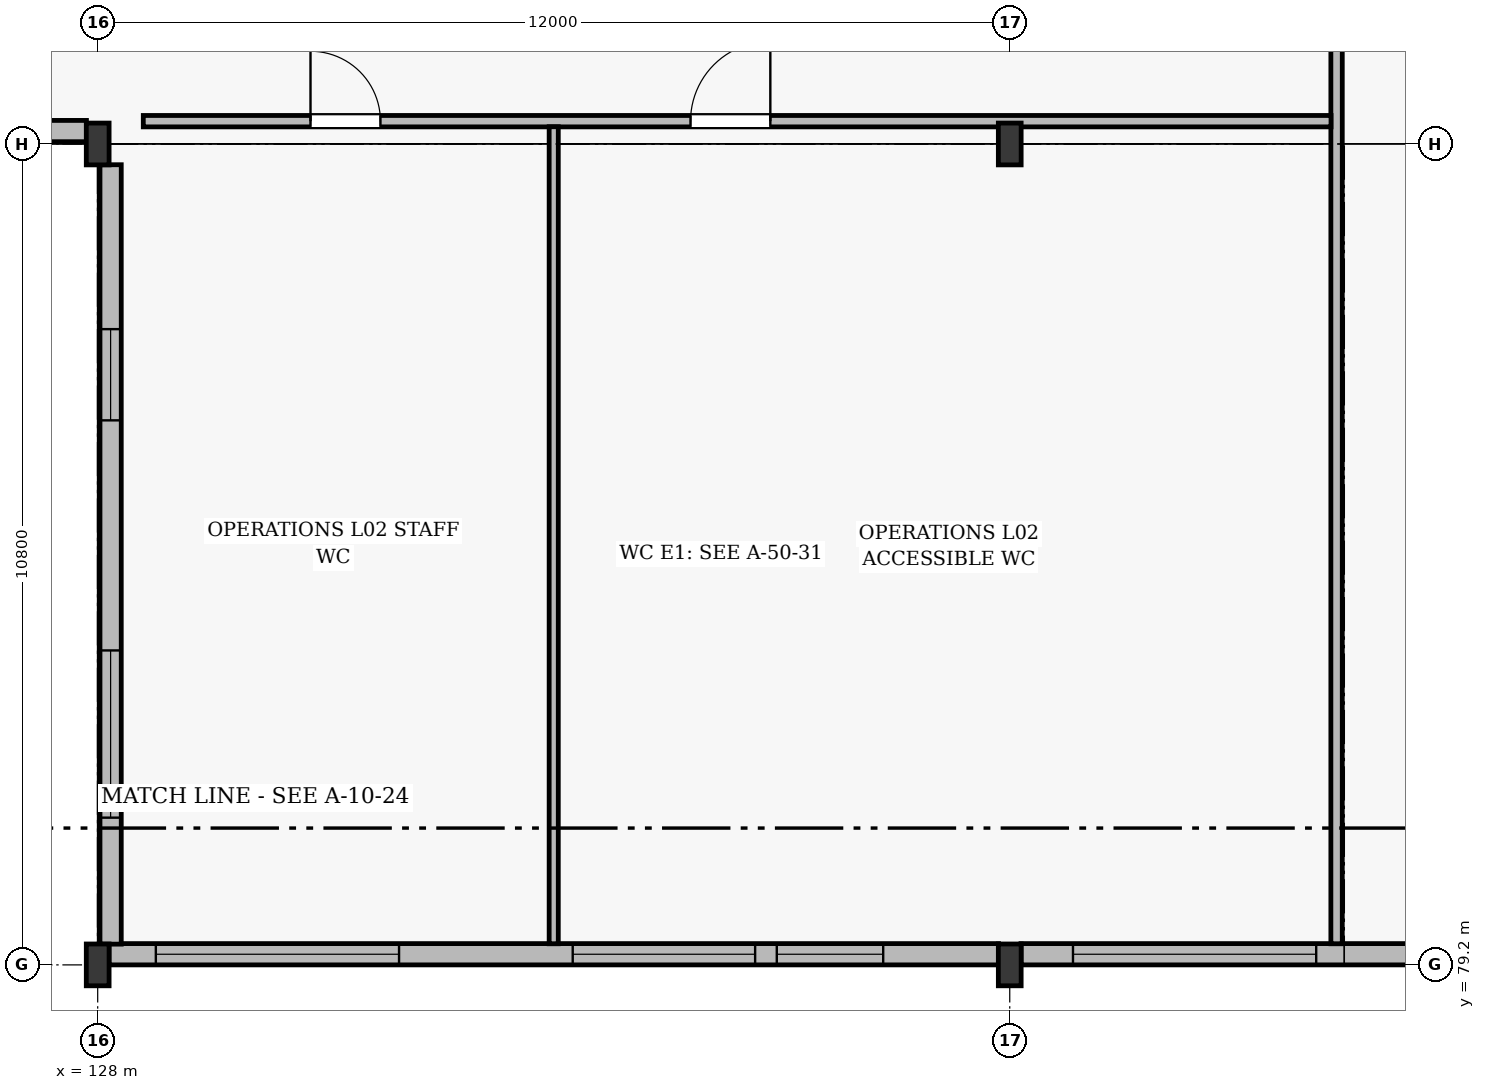
"""IFC4 building model, lengths in metres.
Left out: names, types, materials, properties, quantities, classifications, styles, units other than length and angle.
Written with IfcOpenShell. Run it as: python <this file> out.ifc"""

import sys

from ifc_helpers import new_model, si_unit, direction, frame, frame_2d, origin, origin_2d, place, context, subcontext, project, spatial, rectangle, i_section, extrude, element, fill, save


model = new_model("IFC4")
c1 = context("Model", 3, precision=1e-05, world=origin(), true_north=direction((0.0, 1.0)))
c2 = subcontext(c1, "Body", "Model", "MODEL_VIEW")
j1 = project(units=[si_unit("LENGTHUNIT", "METRE"), si_unit("PLANEANGLEUNIT", "RADIAN")], contexts=[c1])
p1 = place(None, origin())
s1 = spatial("IfcSite", under=j1, at=p1, CompositionType="ELEMENT")
p2 = place(p1, origin())
s2 = spatial("IfcBuilding", under=s1, at=p2, CompositionType="ELEMENT")
p3 = place(p2, frame((0.0, 0.0, 12.6)))
s3 = spatial("IfcBuildingStorey", under=s2, at=p3, CompositionType="ELEMENT", Elevation=12.6)
for number, where, z_axis, x_axis in (
    (1, (128.0, 79.2, 0.0), (0.0, 0.0, 1.0), (1.0, 0.0, 0.0)),
    (2, (128.0, 90.0, 0.0), (0.0, 0.0, 1.0), (1.0, 0.0, 0.0)),
    (3, (140.0, 79.2, 0.0), (0.0, 0.0, 1.0), (1.0, 0.0, 0.0)),
    (4, (140.0, 90.0, 0.0), (0.0, 0.0, 1.0), (1.0, 0.0, 0.0)),
):
    element("IfcColumn", number, at=place(p3, frame(where, z_axis=z_axis, x_axis=x_axis)), inside=s3, PredefinedType="COLUMN", context=c2, shape_type="SweptSolid", body=[
        extrude(i_section(OverallWidth=0.3, OverallDepth=0.55, WebThickness=0.015, FlangeThickness=0.029, at=origin_2d()), origin(), (0.0, 0.0, 1.0), 4.8),
    ])
p4 = place(p3, frame((128.148, 79.34, 0.0), z_axis=(0.0, 0.0, 1.0), x_axis=(1.0, 0.0, 0.0)))
e5 = element("IfcWall", 5, at=p4, inside=s3, PredefinedType="STANDARD", context=c2, shape_type="SweptSolid", body=[
    extrude(rectangle(XDim=11.704, YDim=0.28, at=frame_2d((5.852, 0.0))), origin(), (0.0, 0.0, 1.0), 3.9),
])
p5 = place(p4, frame((0.617, 0.0, 0.75)))
e6 = element("IfcOpeningElement", 6, at=p5, cuts=e5, PredefinedType="OPENING", context=c2, shape_type="SweptSolid", body=[
    extrude(rectangle(XDim=3.2, YDim=2.8, at=frame_2d((1.6, 1.4))), frame((0.0, 0.152, 0.0), z_axis=(0.0, -1.0, 0.0), x_axis=(1.0, 0.0, 0.0)), (0.0, 0.0, 1.0), 0.304),
])
p6 = place(p4, frame((6.102, 0.0, 0.75)))
e7 = element("IfcOpeningElement", 7, at=p6, cuts=e5, PredefinedType="OPENING", context=c2, shape_type="SweptSolid", body=[
    extrude(rectangle(XDim=2.4, YDim=2.4, at=frame_2d((1.2, 1.2))), frame((0.0, 0.152, 0.0), z_axis=(0.0, -1.0, 0.0), x_axis=(1.0, 0.0, 0.0)), (0.0, 0.0, 1.0), 0.304),
])
p7 = place(p4, frame((8.787, 0.0, 1.05)))
e8 = element("IfcOpeningElement", 8, at=p7, cuts=e5, PredefinedType="OPENING", context=c2, shape_type="SweptSolid", body=[
    extrude(rectangle(XDim=1.4, YDim=1.8, at=frame_2d((0.7, 0.9))), frame((0.0, 0.152, 0.0), z_axis=(0.0, -1.0, 0.0), x_axis=(1.0, 0.0, 0.0)), (0.0, 0.0, 1.0), 0.304),
])
p8 = place(p3, frame((140.148, 79.34, 0.0), z_axis=(0.0, 0.0, 1.0), x_axis=(1.0, 0.0, 0.0)))
e9 = element("IfcWall", 9, at=p8, inside=s3, PredefinedType="STANDARD", context=c2, shape_type="SweptSolid", body=[
    extrude(rectangle(XDim=12.704, YDim=0.28, at=frame_2d((6.352, 0.0))), origin(), (0.0, 0.0, 1.0), 3.9),
])
p9 = place(p8, frame((0.684, 0.0, 0.75)))
e10 = element("IfcOpeningElement", 10, at=p9, cuts=e9, PredefinedType="OPENING", context=c2, shape_type="SweptSolid", body=[
    extrude(rectangle(XDim=3.2, YDim=2.8, at=frame_2d((1.6, 1.4))), frame((0.0, 0.152, 0.0), z_axis=(0.0, -1.0, 0.0), x_axis=(1.0, 0.0, 0.0)), (0.0, 0.0, 1.0), 0.304),
])
p10 = place(p8, frame((5.152, 0.0, 0.75)))
e11 = element("IfcOpeningElement", 11, at=p10, cuts=e9, PredefinedType="OPENING", context=c2, shape_type="SweptSolid", body=[
    extrude(rectangle(XDim=2.4, YDim=2.4, at=frame_2d((1.2, 1.2))), frame((0.0, 0.152, 0.0), z_axis=(0.0, -1.0, 0.0), x_axis=(1.0, 0.0, 0.0)), (0.0, 0.0, 1.0), 0.304),
])
p11 = place(p8, frame((9.62, 0.0, 1.05)))
e12 = element("IfcOpeningElement", 12, at=p11, cuts=e9, PredefinedType="OPENING", context=c2, shape_type="SweptSolid", body=[
    extrude(rectangle(XDim=1.4, YDim=1.8, at=frame_2d((0.7, 0.9))), frame((0.0, 0.152, 0.0), z_axis=(0.0, -1.0, 0.0), x_axis=(1.0, 0.0, 0.0)), (0.0, 0.0, 1.0), 0.304),
])
p12 = place(p3, frame((118.148, 90.17, 0.0), z_axis=(0.0, 0.0, 1.0), x_axis=(1.0, 0.0, 0.0)))
e13 = element("IfcWall", 13, at=p12, inside=s3, PredefinedType="STANDARD", context=c2, shape_type="SweptSolid", body=[
    extrude(rectangle(XDim=9.704, YDim=0.28, at=frame_2d((4.852, 0.0))), origin(), (0.0, 0.0, 1.0), 3.9),
])
p13 = place(p12, frame((1.026, 0.0, 0.75)))
e14 = element("IfcOpeningElement", 14, at=p13, cuts=e13, PredefinedType="OPENING", context=c2, shape_type="SweptSolid", body=[
    extrude(rectangle(XDim=3.2, YDim=2.8, at=frame_2d((1.6, 1.4))), frame((0.0, 0.152, 0.0), z_axis=(0.0, -1.0, 0.0), x_axis=(1.0, 0.0, 0.0)), (0.0, 0.0, 1.0), 0.304),
])
p14 = place(p12, frame((5.878, 0.0, 0.75)))
e15 = element("IfcOpeningElement", 15, at=p14, cuts=e13, PredefinedType="OPENING", context=c2, shape_type="SweptSolid", body=[
    extrude(rectangle(XDim=2.4, YDim=2.4, at=frame_2d((1.2, 1.2))), frame((0.0, 0.152, 0.0), z_axis=(0.0, -1.0, 0.0), x_axis=(1.0, 0.0, 0.0)), (0.0, 0.0, 1.0), 0.304),
])
p15 = place(p3, frame((128.17, 79.473, 0.0), z_axis=(0.0, 0.0, 1.0), x_axis=(0.0, 1.0, 0.0)))
e16 = element("IfcWall", 16, at=p15, inside=s3, PredefinedType="STANDARD", context=c2, shape_type="SweptSolid", body=[
    extrude(rectangle(XDim=10.254, YDim=0.28, at=frame_2d((5.127, 0.0))), origin(), (0.0, 0.0, 1.0), 3.9),
])
p16 = place(p15, frame((1.664, 0.0, 0.75)))
e17 = element("IfcOpeningElement", 17, at=p16, cuts=e16, PredefinedType="OPENING", context=c2, shape_type="SweptSolid", body=[
    extrude(rectangle(XDim=2.2, YDim=2.2, at=frame_2d((1.1, 1.1))), frame((0.0, 0.152, 0.0), z_axis=(0.0, -1.0, 0.0), x_axis=(1.0, 0.0, 0.0)), (0.0, 0.0, 1.0), 0.304),
])
p17 = place(p15, frame((6.891, 0.0, 1.05)))
e18 = element("IfcOpeningElement", 18, at=p17, cuts=e16, PredefinedType="OPENING", context=c2, shape_type="SweptSolid", body=[
    extrude(rectangle(XDim=1.2, YDim=0.9, at=frame_2d((0.6, 0.45))), frame((0.0, 0.152, 0.0), z_axis=(0.0, -1.0, 0.0), x_axis=(1.0, 0.0, 0.0)), (0.0, 0.0, 1.0), 0.304),
])
p18 = place(p3, frame((144.3, 79.478, 0.0), z_axis=(0.0, 0.0, 1.0), x_axis=(0.0, 1.0, 0.0)))
e19 = element("IfcWall", 19, at=p18, inside=s3, PredefinedType="PARTITIONING", context=c2, shape_type="SweptSolid", body=[
    extrude(rectangle(XDim=13.964, YDim=0.15, at=frame_2d((6.982, 0.0))), origin(), (0.0, 0.0, 1.0), 3.99),
])
p19 = place(p3, frame((128.6, 90.3, 0.0), z_axis=(0.0, 0.0, 1.0), x_axis=(1.0, 0.0, 0.0)))
e20 = element("IfcWall", 20, at=p19, inside=s3, PredefinedType="PARTITIONING", context=c2, shape_type="SweptSolid", body=[
    extrude(rectangle(XDim=15.627, YDim=0.15, at=frame_2d((7.813, 0.0))), origin(), (0.0, 0.0, 1.0), 3.99),
])
p20 = place(p19, frame((2.2, 0.0, 0.005)))
e21 = element("IfcOpeningElement", 21, at=p20, cuts=e20, PredefinedType="OPENING", context=c2, shape_type="SweptSolid", body=[
    extrude(rectangle(XDim=0.92, YDim=2.12, at=frame_2d((0.46, 1.06))), frame((0.0, 0.087, 0.0), z_axis=(0.0, -1.0, 0.0), x_axis=(1.0, 0.0, 0.0)), (0.0, 0.0, 1.0), 0.174),
])
p21 = place(p19, frame((7.2, 0.0, 0.005)))
e22 = element("IfcOpeningElement", 22, at=p21, cuts=e20, PredefinedType="OPENING", context=c2, shape_type="SweptSolid", body=[
    extrude(rectangle(XDim=1.05, YDim=2.15, at=frame_2d((0.525, 1.075))), frame((0.0, 0.087, 0.0), z_axis=(0.0, -1.0, 0.0), x_axis=(1.0, 0.0, 0.0)), (0.0, 0.0, 1.0), 0.174),
])
p22 = place(p3, frame((134.0, 79.478, 0.0), z_axis=(0.0, 0.0, 1.0), x_axis=(0.0, 1.0, 0.0)))
e23 = element("IfcWall", 23, at=p22, inside=s3, PredefinedType="PARTITIONING", context=c2, shape_type="SweptSolid", body=[
    extrude(rectangle(XDim=10.749, YDim=0.12, at=frame_2d((5.375, 0.0))), origin(), (0.0, 0.0, 1.0), 4.09),
])
p23 = place(p5, origin())
e24 = element("IfcWindow", 24, at=p23, inside=s3, PartitioningType="DOUBLE_PANEL_VERTICAL", PredefinedType="WINDOW", context=c2, shape_type="SweptSolid", body=[
    extrude(rectangle(XDim=3.2, YDim=2.8, at=frame_2d((1.6, 1.4))), frame((0.0, 0.03, 0.0), z_axis=(0.0, -1.0, 0.0), x_axis=(1.0, 0.0, 0.0)), (0.0, 0.0, 1.0), 0.06),
])
fill(e6, e24)
p24 = place(p6, origin())
e25 = element("IfcWindow", 25, at=p24, inside=s3, PartitioningType="DOUBLE_PANEL_VERTICAL", PredefinedType="WINDOW", context=c2, shape_type="SweptSolid", body=[
    extrude(rectangle(XDim=2.4, YDim=2.4, at=frame_2d((1.2, 1.2))), frame((0.0, 0.03, 0.0), z_axis=(0.0, -1.0, 0.0), x_axis=(1.0, 0.0, 0.0)), (0.0, 0.0, 1.0), 0.06),
])
fill(e7, e25)
p25 = place(p7, origin())
e26 = element("IfcWindow", 26, at=p25, inside=s3, PartitioningType="DOUBLE_PANEL_VERTICAL", PredefinedType="WINDOW", context=c2, shape_type="SweptSolid", body=[
    extrude(rectangle(XDim=1.4, YDim=1.8, at=frame_2d((0.7, 0.9))), frame((0.0, 0.03, 0.0), z_axis=(0.0, -1.0, 0.0), x_axis=(1.0, 0.0, 0.0)), (0.0, 0.0, 1.0), 0.06),
])
fill(e8, e26)
p26 = place(p9, origin())
e27 = element("IfcWindow", 27, at=p26, inside=s3, PartitioningType="DOUBLE_PANEL_VERTICAL", PredefinedType="WINDOW", context=c2, shape_type="SweptSolid", body=[
    extrude(rectangle(XDim=3.2, YDim=2.8, at=frame_2d((1.6, 1.4))), frame((0.0, 0.03, 0.0), z_axis=(0.0, -1.0, 0.0), x_axis=(1.0, 0.0, 0.0)), (0.0, 0.0, 1.0), 0.06),
])
fill(e10, e27)
p27 = place(p16, origin())
e28 = element("IfcWindow", 28, at=p27, inside=s3, PartitioningType="DOUBLE_PANEL_VERTICAL", PredefinedType="WINDOW", context=c2, shape_type="SweptSolid", body=[
    extrude(rectangle(XDim=2.2, YDim=2.2, at=frame_2d((1.1, 1.1))), frame((0.0, 0.03, 0.0), z_axis=(0.0, -1.0, 0.0), x_axis=(1.0, 0.0, 0.0)), (0.0, 0.0, 1.0), 0.06),
])
fill(e17, e28)
p28 = place(p17, origin())
e29 = element("IfcWindow", 29, at=p28, inside=s3, PartitioningType="DOUBLE_PANEL_VERTICAL", PredefinedType="WINDOW", context=c2, shape_type="SweptSolid", body=[
    extrude(rectangle(XDim=1.2, YDim=0.9, at=frame_2d((0.6, 0.45))), frame((0.0, 0.03, 0.0), z_axis=(0.0, -1.0, 0.0), x_axis=(1.0, 0.0, 0.0)), (0.0, 0.0, 1.0), 0.06),
])
fill(e18, e29)
p29 = place(p20, origin())
e30 = element("IfcDoor", 30, at=p29, inside=s3, OperationType="SINGLE_SWING_LEFT", PredefinedType="DOOR", context=c2, shape_type="SweptSolid", body=[
    extrude(rectangle(XDim=0.92, YDim=2.12, at=frame_2d((0.46, 1.06))), frame((0.0, 0.025, 0.0), z_axis=(0.0, -1.0, 0.0), x_axis=(1.0, 0.0, 0.0)), (0.0, 0.0, 1.0), 0.05),
])
fill(e21, e30)
p30 = place(p21, origin())
e31 = element("IfcDoor", 31, at=p30, inside=s3, OperationType="SINGLE_SWING_RIGHT", PredefinedType="DOOR", context=c2, shape_type="SweptSolid", body=[
    extrude(rectangle(XDim=1.05, YDim=2.15, at=frame_2d((0.525, 1.075))), frame((0.0, 0.025, 0.0), z_axis=(0.0, -1.0, 0.0), x_axis=(1.0, 0.0, 0.0)), (0.0, 0.0, 1.0), 0.05),
])
fill(e22, e31)
save(model, sys.argv[1])
